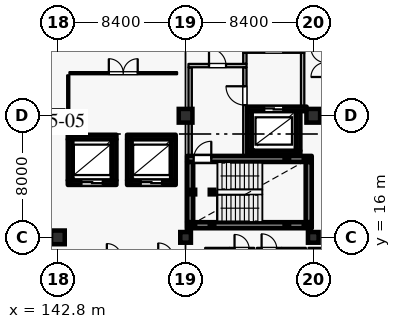
"""IFC4 building model, lengths in metres.
Left out: names, types, materials, properties, quantities, classifications, styles, units other than length and angle.
Written with IfcOpenShell. Run it as: python <this file> out.ifc"""

import sys

from ifc_helpers import new_model, si_unit, direction, frame, frame_2d, origin, origin_2d, place, context, subcontext, project, spatial, rectangle, hollow_rectangle, extrude, element, fill, save


model = new_model("IFC4")
c1 = context("Model", 3, precision=1e-05, world=origin(), true_north=direction((0.0, 1.0)))
c2 = subcontext(c1, "Body", "Model", "MODEL_VIEW")
j1 = project(units=[si_unit("LENGTHUNIT", "METRE"), si_unit("PLANEANGLEUNIT", "RADIAN")], contexts=[c1])
p1 = place(None, origin())
s1 = spatial("IfcSite", under=j1, at=p1, CompositionType="ELEMENT")
p2 = place(p1, origin())
s2 = spatial("IfcBuilding", under=s1, at=p2, CompositionType="ELEMENT")
p3 = place(p2, frame((0.0, 0.0, 25.2)))
s3 = spatial("IfcBuildingStorey", under=s2, at=p3, CompositionType="ELEMENT", Elevation=25.2)
for number, where, z_axis, x_axis in (
    (1, (142.8, 16.0, 0.0), (0.0, 0.0, 1.0), (1.0, 0.0, 0.0)),
    (2, (151.2, 24.0, 0.0), (0.0, 0.0, 1.0), (1.0, 0.0, 0.0)),
    (3, (159.6, 24.0, 0.0), (0.0, 0.0, 1.0), (1.0, 0.0, 0.0)),
):
    element("IfcColumn", number, at=place(p3, frame(where, z_axis=z_axis, x_axis=x_axis)), inside=s3, PredefinedType="COLUMN", context=c2, shape_type="SweptSolid", body=[
        extrude(rectangle(XDim=0.9, YDim=0.9, at=origin_2d()), origin(), (0.0, 0.0, 1.0), 3.6),
    ])
for number, where, z_axis, x_axis in (
    (4, (142.8, 24.0, 0.0), (0.0, 0.0, 1.0), (1.0, 0.0, 0.0)),
    (5, (151.2, 16.0, 0.0), (0.0, 0.0, 1.0), (1.0, 0.0, 0.0)),
    (6, (159.6, 16.0, 0.0), (0.0, 0.0, 1.0), (1.0, 0.0, 0.0)),
):
    element("IfcColumn", number, at=place(p3, frame(where, z_axis=z_axis, x_axis=x_axis)), inside=s3, PredefinedType="COLUMN", context=c2, shape_type="SweptSolid", body=[
        extrude(rectangle(XDim=0.7, YDim=0.7, at=origin_2d()), origin(), (0.0, 0.0, 1.0), 3.6),
    ])
p4 = place(p3, frame((167.6, 15.619, 0.0), z_axis=(0.0, 0.0, 1.0), x_axis=(-0.724156739794, -0.689635422677, 0.0)))
e7 = element("IfcWall", 7, at=p4, inside=s3, PredefinedType="SOLIDWALL", context=c2, shape_type="SweptSolid", body=[
    extrude(rectangle(XDim=10.495, YDim=0.24, at=frame_2d((5.248, 0.0))), origin(), (0.0, 0.0, 1.0), 2.93),
])
p5 = place(p4, frame((0.286, 0.0, 0.0)))
e8 = element("IfcOpeningElement", 8, at=p5, cuts=e7, PredefinedType="OPENING", context=c2, shape_type="SweptSolid", body=[
    extrude(rectangle(XDim=1.5, YDim=2.25, at=frame_2d((0.75, 1.125))), frame((0.0, 0.13, 0.0), z_axis=(0.0, -1.0, 0.0), x_axis=(1.0, 0.0, 0.0)), (0.0, 0.0, 1.0), 0.26),
])
p6 = place(p4, frame((3.757, 0.0, 0.8)))
e9 = element("IfcOpeningElement", 9, at=p6, cuts=e7, PredefinedType="OPENING", context=c2, shape_type="SweptSolid", body=[
    extrude(rectangle(XDim=1.6, YDim=1.6, at=frame_2d((0.8, 0.8))), frame((0.0, 0.13, 0.0), z_axis=(0.0, -1.0, 0.0), x_axis=(1.0, 0.0, 0.0)), (0.0, 0.0, 1.0), 0.26),
])
p7 = place(p4, frame((7.969, 0.0, 0.8)))
e10 = element("IfcOpeningElement", 10, at=p7, cuts=e7, PredefinedType="OPENING", context=c2, shape_type="SweptSolid", body=[
    extrude(rectangle(XDim=1.6, YDim=1.6, at=frame_2d((0.8, 0.8))), frame((0.0, 0.13, 0.0), z_axis=(0.0, -1.0, 0.0), x_axis=(1.0, 0.0, 0.0)), (0.0, 0.0, 1.0), 0.26),
])
p8 = place(p3, frame((155.25, 21.55, 0.0), z_axis=(0.0, 0.0, 1.0), x_axis=(1.0, 0.0, 0.0)))
e11 = element("IfcWall", 11, at=p8, inside=s3, PredefinedType="SHEAR", context=c2, shape_type="SweptSolid", body=[
    extrude(rectangle(XDim=3.5, YDim=0.3, at=frame_2d((1.75, 0.0))), origin(), (0.0, 0.0, 1.0), 3.335),
])
p9 = place(p3, frame((158.6, 21.705, 0.0), z_axis=(0.0, 0.0, 1.0), x_axis=(0.0, 1.0, 0.0)))
e12 = element("IfcWall", 12, at=p9, inside=s3, PredefinedType="SHEAR", context=c2, shape_type="SweptSolid", body=[
    extrude(rectangle(XDim=2.59, YDim=0.3, at=frame_2d((1.295, 0.0))), origin(), (0.0, 0.0, 1.0), 3.335),
])
p10 = place(p3, frame((159.16, 24.45, 0.0), z_axis=(0.0, 0.0, 1.0), x_axis=(-1.0, 0.0, 0.0)))
e13 = element("IfcWall", 13, at=p10, inside=s3, PredefinedType="SHEAR", context=c2, shape_type="SweptSolid", body=[
    extrude(rectangle(XDim=3.91, YDim=0.3, at=frame_2d((1.955, 0.0))), origin(), (0.0, 0.0, 1.0), 3.335),
])
p11 = place(p10, frame((1.535, 0.0, 0.0)))
e14 = element("IfcOpeningElement", 14, at=p11, cuts=e13, PredefinedType="OPENING", context=c2, shape_type="SweptSolid", body=[
    extrude(rectangle(XDim=1.25, YDim=2.25, at=frame_2d((0.625, 1.125))), frame((0.0, 0.16, 0.0), z_axis=(0.0, -1.0, 0.0), x_axis=(1.0, 0.0, 0.0)), (0.0, 0.0, 1.0), 0.32),
])
p12 = place(p3, frame((155.4, 24.295, 0.0), z_axis=(0.0, 0.0, 1.0), x_axis=(0.0, -1.0, 0.0)))
e15 = element("IfcWall", 15, at=p12, inside=s3, PredefinedType="SHEAR", context=c2, shape_type="SweptSolid", body=[
    extrude(rectangle(XDim=2.59, YDim=0.3, at=frame_2d((1.295, 0.0))), origin(), (0.0, 0.0, 1.0), 3.335),
])
p13 = place(p3, frame((143.45, 19.6, 0.0), z_axis=(0.0, 0.0, 1.0), x_axis=(1.0, 0.0, 0.0)))
e16 = element("IfcWall", 16, at=p13, inside=s3, PredefinedType="SHEAR", context=c2, shape_type="SweptSolid", body=[
    extrude(rectangle(XDim=3.2, YDim=0.3, at=frame_2d((1.6, 0.0))), origin(), (0.0, 0.0, 1.0), 3.335),
])
p14 = place(p13, frame((0.9, 0.0, 0.0)))
e17 = element("IfcOpeningElement", 17, at=p14, cuts=e16, PredefinedType="OPENING", context=c2, shape_type="SweptSolid", body=[
    extrude(rectangle(XDim=1.4, YDim=2.35, at=frame_2d((0.7, 1.175))), frame((0.0, 0.16, 0.0), z_axis=(0.0, -1.0, 0.0), x_axis=(1.0, 0.0, 0.0)), (0.0, 0.0, 1.0), 0.32),
])
p15 = place(p3, frame((146.5, 19.755, 0.0), z_axis=(0.0, 0.0, 1.0), x_axis=(0.0, 1.0, 0.0)))
e18 = element("IfcWall", 18, at=p15, inside=s3, PredefinedType="SHEAR", context=c2, shape_type="SweptSolid", body=[
    extrude(rectangle(XDim=2.69, YDim=0.3, at=frame_2d((1.345, 0.0))), origin(), (0.0, 0.0, 1.0), 3.335),
])
p16 = place(p3, frame((146.65, 22.6, 0.0), z_axis=(0.0, 0.0, 1.0), x_axis=(-1.0, 0.0, 0.0)))
e19 = element("IfcWall", 19, at=p16, inside=s3, PredefinedType="SHEAR", context=c2, shape_type="SweptSolid", body=[
    extrude(rectangle(XDim=3.2, YDim=0.3, at=frame_2d((1.6, 0.0))), origin(), (0.0, 0.0, 1.0), 3.335),
])
p17 = place(p3, frame((143.6, 22.445, 0.0), z_axis=(0.0, 0.0, 1.0), x_axis=(0.0, -1.0, 0.0)))
e20 = element("IfcWall", 20, at=p17, inside=s3, PredefinedType="SHEAR", context=c2, shape_type="SweptSolid", body=[
    extrude(rectangle(XDim=2.69, YDim=0.3, at=frame_2d((1.345, 0.0))), origin(), (0.0, 0.0, 1.0), 3.335),
])
p18 = place(p3, frame((147.35, 19.6, 0.0), z_axis=(0.0, 0.0, 1.0), x_axis=(1.0, 0.0, 0.0)))
e21 = element("IfcWall", 21, at=p18, inside=s3, PredefinedType="SHEAR", context=c2, shape_type="SweptSolid", body=[
    extrude(rectangle(XDim=3.2, YDim=0.3, at=frame_2d((1.6, 0.0))), origin(), (0.0, 0.0, 1.0), 3.335),
])
p19 = place(p18, frame((0.9, 0.0, 0.0)))
e22 = element("IfcOpeningElement", 22, at=p19, cuts=e21, PredefinedType="OPENING", context=c2, shape_type="SweptSolid", body=[
    extrude(rectangle(XDim=1.4, YDim=2.35, at=frame_2d((0.7, 1.175))), frame((0.0, 0.16, 0.0), z_axis=(0.0, -1.0, 0.0), x_axis=(1.0, 0.0, 0.0)), (0.0, 0.0, 1.0), 0.32),
])
p20 = place(p3, frame((150.4, 19.755, 0.0), z_axis=(0.0, 0.0, 1.0), x_axis=(0.0, 1.0, 0.0)))
e23 = element("IfcWall", 23, at=p20, inside=s3, PredefinedType="SHEAR", context=c2, shape_type="SweptSolid", body=[
    extrude(rectangle(XDim=2.69, YDim=0.3, at=frame_2d((1.345, 0.0))), origin(), (0.0, 0.0, 1.0), 3.335),
])
p21 = place(p3, frame((150.55, 22.6, 0.0), z_axis=(0.0, 0.0, 1.0), x_axis=(-1.0, 0.0, 0.0)))
e24 = element("IfcWall", 24, at=p21, inside=s3, PredefinedType="SHEAR", context=c2, shape_type="SweptSolid", body=[
    extrude(rectangle(XDim=3.2, YDim=0.3, at=frame_2d((1.6, 0.0))), origin(), (0.0, 0.0, 1.0), 3.335),
])
p22 = place(p3, frame((147.5, 22.445, 0.0), z_axis=(0.0, 0.0, 1.0), x_axis=(0.0, -1.0, 0.0)))
e25 = element("IfcWall", 25, at=p22, inside=s3, PredefinedType="SHEAR", context=c2, shape_type="SweptSolid", body=[
    extrude(rectangle(XDim=2.69, YDim=0.3, at=frame_2d((1.345, 0.0))), origin(), (0.0, 0.0, 1.0), 3.335),
])
p23 = place(p3, frame((151.3, 16.8, 0.0), z_axis=(0.0, 0.0, 1.0), x_axis=(1.0, 0.0, 0.0)))
e26 = element("IfcWall", 26, at=p23, inside=s3, PredefinedType="SHEAR", context=c2, shape_type="SweptSolid", body=[
    extrude(rectangle(XDim=8.2, YDim=0.4, at=frame_2d((4.1, 0.0))), origin(), (0.0, 0.0, 1.0), 3.335),
])
p24 = place(p3, frame((159.3, 17.005, 0.0), z_axis=(0.0, 0.0, 1.0), x_axis=(0.0, 1.0, 0.0)))
e27 = element("IfcWall", 27, at=p24, inside=s3, PredefinedType="SHEAR", context=c2, shape_type="SweptSolid", body=[
    extrude(rectangle(XDim=3.95, YDim=0.4, at=frame_2d((1.975, 0.0))), origin(), (0.0, 0.0, 1.0), 3.335),
])
p25 = place(p3, frame((151.3, 21.16, 0.0), z_axis=(0.0, 0.0, 1.0), x_axis=(1.0, 0.0, 0.0)))
e28 = element("IfcWall", 28, at=p25, inside=s3, PredefinedType="SHEAR", context=c2, shape_type="SweptSolid", body=[
    extrude(rectangle(XDim=8.2, YDim=0.4, at=frame_2d((4.1, 0.0))), origin(), (0.0, 0.0, 1.0), 3.335),
])
p26 = place(p25, frame((0.43, 0.0, 0.0)))
e29 = element("IfcOpeningElement", 29, at=p26, cuts=e28, PredefinedType="OPENING", context=c2, shape_type="SweptSolid", body=[
    extrude(rectangle(XDim=1.16, YDim=2.2, at=frame_2d((0.58, 1.1))), frame((0.0, 0.21, 0.0), z_axis=(0.0, -1.0, 0.0), x_axis=(1.0, 0.0, 0.0)), (0.0, 0.0, 1.0), 0.42),
])
p27 = place(p3, frame((151.5, 17.005, 0.0), z_axis=(0.0, 0.0, 1.0), x_axis=(0.0, 1.0, 0.0)))
e30 = element("IfcWall", 30, at=p27, inside=s3, PredefinedType="SHEAR", context=c2, shape_type="SweptSolid", body=[
    extrude(rectangle(XDim=3.95, YDim=0.4, at=frame_2d((1.975, 0.0))), origin(), (0.0, 0.0, 1.0), 3.335),
])
p28 = place(p3, frame((151.5, 21.365, 0.0), z_axis=(0.0, 0.0, 1.0), x_axis=(0.0, 1.0, 0.0)))
e31 = element("IfcWall", 31, at=p28, inside=s3, PredefinedType="PARTITIONING", context=c2, shape_type="SweptSolid", body=[
    extrude(rectangle(XDim=5.82, YDim=0.22, at=frame_2d((2.91, 0.0))), origin(), (0.0, 0.0, 1.0), 3.335),
])
p29 = place(p3, frame((151.39, 27.3, 0.0), z_axis=(0.0, 0.0, 1.0), x_axis=(1.0, 0.0, 0.0)))
e32 = element("IfcWall", 32, at=p29, inside=s3, PredefinedType="PARTITIONING", context=c2, shape_type="SweptSolid", body=[
    extrude(rectangle(XDim=3.82, YDim=0.22, at=frame_2d((1.91, 0.0))), origin(), (0.0, 0.0, 1.0), 3.335),
])
p30 = place(p29, frame((1.35, 0.0, 0.0)))
e33 = element("IfcOpeningElement", 33, at=p30, cuts=e32, PredefinedType="OPENING", context=c2, shape_type="SweptSolid", body=[
    extrude(rectangle(XDim=1.12, YDim=2.2, at=frame_2d((0.56, 1.1))), frame((0.0, 0.12, 0.0), z_axis=(0.0, -1.0, 0.0), x_axis=(1.0, 0.0, 0.0)), (0.0, 0.0, 1.0), 0.24),
])
p31 = place(p3, frame((155.1, 21.365, 0.0), z_axis=(0.0, 0.0, 1.0), x_axis=(0.0, 1.0, 0.0)))
e34 = element("IfcWall", 34, at=p31, inside=s3, PredefinedType="PARTITIONING", context=c2, shape_type="SweptSolid", body=[
    extrude(rectangle(XDim=5.82, YDim=0.22, at=frame_2d((2.91, 0.0))), origin(), (0.0, 0.0, 1.0), 3.335),
])
p32 = place(p31, frame((3.335, 0.0, 0.0)))
e35 = element("IfcOpeningElement", 35, at=p32, cuts=e34, PredefinedType="OPENING", context=c2, shape_type="SweptSolid", body=[
    extrude(rectangle(XDim=1.24, YDim=2.2, at=frame_2d((0.62, 1.1))), frame((0.0, 0.12, 0.0), z_axis=(0.0, -1.0, 0.0), x_axis=(1.0, 0.0, 0.0)), (0.0, 0.0, 1.0), 0.24),
])
p33 = place(p3, frame((155.1, 27.415, 0.0), z_axis=(0.0, 0.0, 1.0), x_axis=(0.0, 1.0, 0.0)))
e36 = element("IfcWall", 36, at=p33, inside=s3, PredefinedType="PARTITIONING", context=c2, shape_type="SweptSolid", body=[
    extrude(rectangle(XDim=0.72, YDim=0.22, at=frame_2d((0.36, 0.0))), origin(), (0.0, 0.0, 1.0), 3.335),
])
p34 = place(p3, frame((158.9, 24.605, 0.0), z_axis=(0.0, 0.0, 1.0), x_axis=(0.0, 1.0, 0.0)))
e37 = element("IfcWall", 37, at=p34, inside=s3, PredefinedType="PARTITIONING", context=c2, shape_type="SweptSolid", body=[
    extrude(rectangle(XDim=3.53, YDim=0.22, at=frame_2d((1.765, 0.0))), origin(), (0.0, 0.0, 1.0), 3.335),
])
p35 = place(p3, frame((154.99, 28.25, 0.0), z_axis=(0.0, 0.0, 1.0), x_axis=(1.0, 0.0, 0.0)))
e38 = element("IfcWall", 38, at=p35, inside=s3, PredefinedType="PARTITIONING", context=c2, shape_type="SweptSolid", body=[
    extrude(rectangle(XDim=4.02, YDim=0.22, at=frame_2d((2.01, 0.0))), origin(), (0.0, 0.0, 1.0), 3.335),
])
p36 = place(p35, frame((1.39, 0.0, 0.0)))
e39 = element("IfcOpeningElement", 39, at=p36, cuts=e38, PredefinedType="OPENING", context=c2, shape_type="SweptSolid", body=[
    extrude(rectangle(XDim=1.24, YDim=2.2, at=frame_2d((0.62, 1.1))), frame((0.0, 0.12, 0.0), z_axis=(0.0, -1.0, 0.0), x_axis=(1.0, 0.0, 0.0)), (0.0, 0.0, 1.0), 0.24),
])
for number, where, z_axis, x_axis in (
    (40, (151.68, 16.8, 0.0), (0.0, 0.0, 1.0), (1.0, 0.0, 0.0)),
    (41, (151.68, 18.98, 0.0), (0.0, 0.0, 1.0), (1.0, 0.0, 0.0)),
    (42, (152.94, 16.8, 0.0), (0.0, 0.0, 1.0), (1.0, 0.0, 0.0)),
    (43, (152.94, 18.98, 0.0), (0.0, 0.0, 1.0), (1.0, 0.0, 0.0)),
):
    element("IfcColumn", number, at=place(p3, frame(where, z_axis=z_axis, x_axis=x_axis)), inside=s3, PredefinedType="COLUMN", context=c2, shape_type="SweptSolid", body=[
        extrude(hollow_rectangle(XDim=0.3, YDim=0.3, WallThickness=0.012, at=origin_2d()), origin(), (0.0, 0.0, 1.0), 3.42),
    ])
for number, where, z_axis, x_axis in (
    (44, (157.86, 16.8, -2.1), (0.0, 0.0, 1.0), (1.0, 0.0, 0.0)),
    (45, (157.86, 21.16, -2.1), (0.0, 0.0, 1.0), (1.0, 0.0, 0.0)),
    (46, (159.12, 16.8, -2.1), (0.0, 0.0, 1.0), (1.0, 0.0, 0.0)),
    (47, (159.12, 21.16, -2.1), (0.0, 0.0, 1.0), (1.0, 0.0, 0.0)),
):
    element("IfcColumn", number, at=place(p3, frame(where, z_axis=z_axis, x_axis=x_axis)), inside=s3, PredefinedType="COLUMN", context=c2, shape_type="SweptSolid", body=[
        extrude(hollow_rectangle(XDim=0.3, YDim=0.3, WallThickness=0.012, at=origin_2d()), origin(), (0.0, 0.0, 1.0), 3.72),
    ])
p37 = place(p3, frame((152.49, 15.23, 0.0), z_axis=(0.0, 0.0, 1.0), x_axis=(1.0, 0.0, 0.0)))
e48 = element("IfcWall", 48, at=p37, inside=s3, PredefinedType="PARTITIONING", context=c2, shape_type="SweptSolid", body=[
    extrude(rectangle(XDim=1.59, YDim=0.16, at=frame_2d((0.795, 0.0))), origin(), (0.0, 0.0, 1.0), 3.335),
])
p38 = place(p3, frame((154.09, 15.23, 0.0), z_axis=(0.0, 0.0, 1.0), x_axis=(1.0, 0.0, 0.0)))
e49 = element("IfcWall", 49, at=p38, inside=s3, PredefinedType="PARTITIONING", context=c2, shape_type="SweptSolid", body=[
    extrude(rectangle(XDim=1.62, YDim=0.16, at=frame_2d((0.81, 0.0))), origin(), (0.0, 0.0, 1.0), 3.335),
])
p39 = place(p38, frame((0.33, 0.0, 0.0)))
e50 = element("IfcOpeningElement", 50, at=p39, cuts=e49, PredefinedType="OPENING", context=c2, shape_type="SweptSolid", body=[
    extrude(rectangle(XDim=0.96, YDim=2.2, at=frame_2d((0.48, 1.1))), frame((0.0, 0.09, 0.0), z_axis=(0.0, -1.0, 0.0), x_axis=(1.0, 0.0, 0.0)), (0.0, 0.0, 1.0), 0.18),
])
p40 = place(p3, frame((155.89, 15.23, 0.0), z_axis=(0.0, 0.0, 1.0), x_axis=(1.0, 0.0, 0.0)))
e51 = element("IfcWall", 51, at=p40, inside=s3, PredefinedType="PARTITIONING", context=c2, shape_type="SweptSolid", body=[
    extrude(rectangle(XDim=1.62, YDim=0.16, at=frame_2d((0.81, 0.0))), origin(), (0.0, 0.0, 1.0), 3.335),
])
p41 = place(p40, frame((0.31, 0.0, 0.0)))
e52 = element("IfcOpeningElement", 52, at=p41, cuts=e51, PredefinedType="OPENING", context=c2, shape_type="SweptSolid", body=[
    extrude(rectangle(XDim=1.0, YDim=2.25, at=frame_2d((0.5, 1.125))), frame((0.0, 0.09, 0.0), z_axis=(0.0, -1.0, 0.0), x_axis=(1.0, 0.0, 0.0)), (0.0, 0.0, 1.0), 0.18),
])
p42 = place(p3, frame((157.52, 15.23, 0.0), z_axis=(0.0, 0.0, 1.0), x_axis=(1.0, 0.0, 0.0)))
e53 = element("IfcWall", 53, at=p42, inside=s3, PredefinedType="PARTITIONING", context=c2, shape_type="SweptSolid", body=[
    extrude(rectangle(XDim=1.59, YDim=0.16, at=frame_2d((0.795, 0.0))), origin(), (0.0, 0.0, 1.0), 3.335),
])
p43 = place(p3, frame((159.29, 15.23, 0.0), z_axis=(0.0, 0.0, 1.0), x_axis=(1.0, 0.0, 0.0)))
e54 = element("IfcWall", 54, at=p43, inside=s3, PredefinedType="PARTITIONING", context=c2, shape_type="SweptSolid", body=[
    extrude(rectangle(XDim=1.59, YDim=0.16, at=frame_2d((0.795, 0.0))), origin(), (0.0, 0.0, 1.0), 3.335),
])
p44 = place(p3, frame((143.56, 26.8, 0.0), z_axis=(0.0, 0.0, 1.0), x_axis=(1.0, 0.0, 0.0)))
e55 = element("IfcWall", 55, at=p44, inside=s3, PredefinedType="PARTITIONING", context=c2, shape_type="SweptSolid", body=[
    extrude(rectangle(XDim=7.08, YDim=0.14, at=frame_2d((3.54, 0.0))), origin(), (0.0, 0.0, 1.0), 3.335),
])
p45 = place(p44, frame((2.59, 0.0, 0.0)))
e56 = element("IfcOpeningElement", 56, at=p45, cuts=e55, PredefinedType="OPENING", context=c2, shape_type="SweptSolid", body=[
    extrude(rectangle(XDim=1.9, YDim=2.4, at=frame_2d((0.95, 1.2))), frame((0.0, 0.08, 0.0), z_axis=(0.0, -1.0, 0.0), x_axis=(1.0, 0.0, 0.0)), (0.0, 0.0, 1.0), 0.16),
])
p46 = place(p3, frame((143.48, 23.45, 0.0), z_axis=(0.0, 0.0, 1.0), x_axis=(0.0, 1.0, 0.0)))
e57 = element("IfcWall", 57, at=p46, inside=s3, PredefinedType="PARTITIONING", context=c2, shape_type="SweptSolid", body=[
    extrude(rectangle(XDim=3.21, YDim=0.14, at=frame_2d((1.605, 0.0))), origin(), (0.0, 0.0, 1.0), 3.335),
])
p47 = place(p11, origin())
e58 = element("IfcDoor", 58, at=p47, inside=s3, OperationType="DOUBLE_DOOR_SLIDING", PredefinedType="DOOR", context=c2, shape_type="SweptSolid", body=[
    extrude(rectangle(XDim=1.25, YDim=2.25, at=frame_2d((0.625, 1.125))), frame((0.0, 0.025, 0.0), z_axis=(0.0, -1.0, 0.0), x_axis=(1.0, 0.0, 0.0)), (0.0, 0.0, 1.0), 0.05),
])
fill(e14, e58)
p48 = place(p14, origin())
e59 = element("IfcDoor", 59, at=p48, inside=s3, OperationType="DOUBLE_DOOR_SLIDING", PredefinedType="DOOR", context=c2, shape_type="SweptSolid", body=[
    extrude(rectangle(XDim=1.4, YDim=2.35, at=frame_2d((0.7, 1.175))), frame((0.0, 0.025, 0.0), z_axis=(0.0, -1.0, 0.0), x_axis=(1.0, 0.0, 0.0)), (0.0, 0.0, 1.0), 0.05),
])
fill(e17, e59)
p49 = place(p19, origin())
e60 = element("IfcDoor", 60, at=p49, inside=s3, OperationType="DOUBLE_DOOR_SLIDING", PredefinedType="DOOR", context=c2, shape_type="SweptSolid", body=[
    extrude(rectangle(XDim=1.4, YDim=2.35, at=frame_2d((0.7, 1.175))), frame((0.0, 0.025, 0.0), z_axis=(0.0, -1.0, 0.0), x_axis=(1.0, 0.0, 0.0)), (0.0, 0.0, 1.0), 0.05),
])
fill(e22, e60)
p50 = place(p26, origin())
e61 = element("IfcDoor", 61, at=p50, inside=s3, OperationType="SINGLE_SWING_RIGHT", PredefinedType="DOOR", context=c2, shape_type="SweptSolid", body=[
    extrude(rectangle(XDim=1.16, YDim=2.2, at=frame_2d((0.58, 1.1))), frame((0.0, 0.025, 0.0), z_axis=(0.0, -1.0, 0.0), x_axis=(1.0, 0.0, 0.0)), (0.0, 0.0, 1.0), 0.05),
])
fill(e29, e61)
p51 = place(p30, origin())
e62 = element("IfcDoor", 62, at=p51, inside=s3, OperationType="SINGLE_SWING_LEFT", PredefinedType="DOOR", context=c2, shape_type="SweptSolid", body=[
    extrude(rectangle(XDim=1.12, YDim=2.2, at=frame_2d((0.56, 1.1))), frame((0.0, 0.025, 0.0), z_axis=(0.0, -1.0, 0.0), x_axis=(1.0, 0.0, 0.0)), (0.0, 0.0, 1.0), 0.05),
])
fill(e33, e62)
p52 = place(p32, origin())
e63 = element("IfcDoor", 63, at=p52, inside=s3, OperationType="SINGLE_SWING_RIGHT", PredefinedType="DOOR", context=c2, shape_type="SweptSolid", body=[
    extrude(rectangle(XDim=1.24, YDim=2.2, at=frame_2d((0.62, 1.1))), frame((0.0, 0.025, 0.0), z_axis=(0.0, -1.0, 0.0), x_axis=(1.0, 0.0, 0.0)), (0.0, 0.0, 1.0), 0.05),
])
fill(e35, e63)
p53 = place(p39, origin())
e64 = element("IfcDoor", 64, at=p53, inside=s3, OperationType="SINGLE_SWING_LEFT", PredefinedType="DOOR", context=c2, shape_type="SweptSolid", body=[
    extrude(rectangle(XDim=0.96, YDim=2.2, at=frame_2d((0.48, 1.1))), frame((0.0, 0.025, 0.0), z_axis=(0.0, -1.0, 0.0), x_axis=(1.0, 0.0, 0.0)), (0.0, 0.0, 1.0), 0.05),
])
fill(e50, e64)
p54 = place(p41, origin())
e65 = element("IfcDoor", 65, at=p54, inside=s3, OperationType="SINGLE_SWING_LEFT", PredefinedType="DOOR", context=c2, shape_type="SweptSolid", body=[
    extrude(rectangle(XDim=1.0, YDim=2.25, at=frame_2d((0.5, 1.125))), frame((0.0, 0.025, 0.0), z_axis=(0.0, -1.0, 0.0), x_axis=(1.0, 0.0, 0.0)), (0.0, 0.0, 1.0), 0.05),
])
fill(e52, e65)
p55 = place(p45, origin())
e66 = element("IfcDoor", 66, at=p55, inside=s3, OperationType="DOUBLE_DOOR_SINGLE_SWING", PredefinedType="DOOR", context=c2, shape_type="SweptSolid", body=[
    extrude(rectangle(XDim=1.9, YDim=2.4, at=frame_2d((0.95, 1.2))), frame((0.0, 0.025, 0.0), z_axis=(0.0, -1.0, 0.0), x_axis=(1.0, 0.0, 0.0)), (0.0, 0.0, 1.0), 0.05),
])
fill(e56, e66)
save(model, sys.argv[1])
